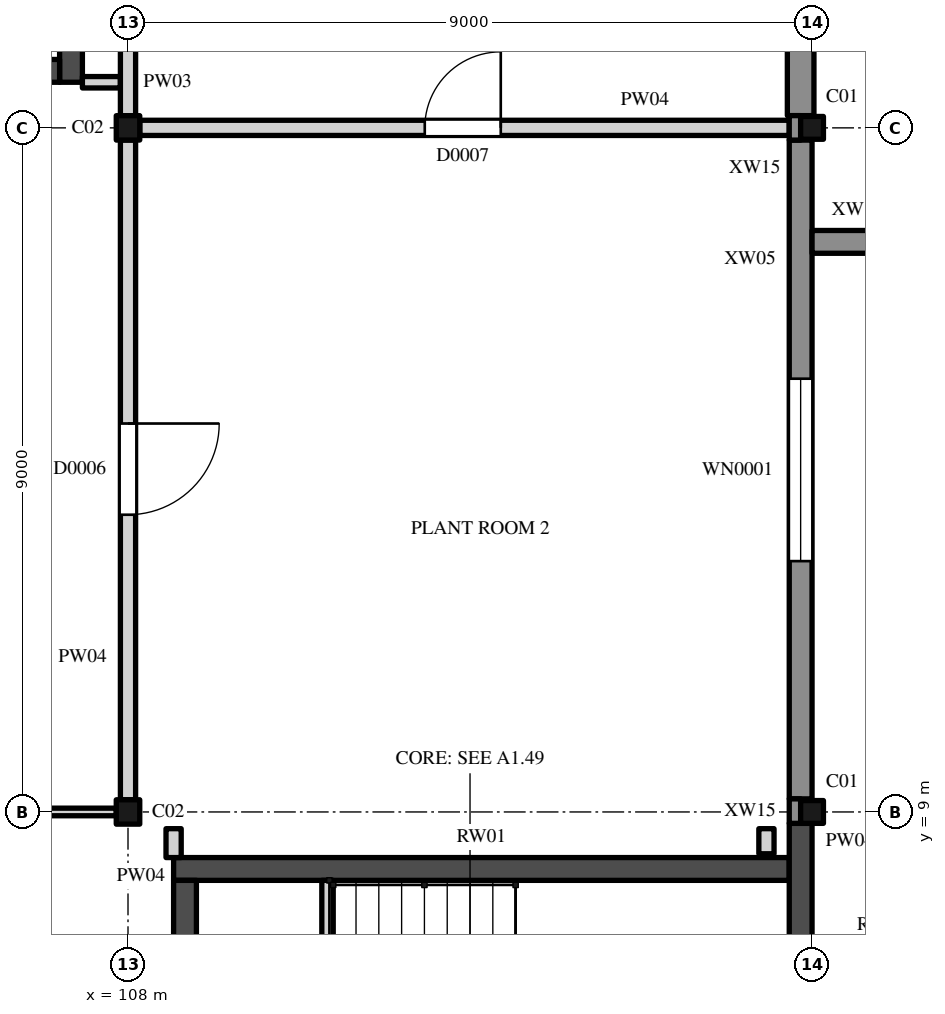
"""IFC4 building model, lengths in metres.
Left out: names, types, materials, properties, quantities, classifications, styles, units other than length and angle.
Written with IfcOpenShell. Run it as: python <this file> out.ifc"""

import sys

from ifc_helpers import new_model, si_unit, direction, frame, frame_2d, origin, origin_2d, place, context, subcontext, project, spatial, polyline, rectangle, hollow_rectangle, i_section, outline, extrude, element, fill, save


model = new_model("IFC4")
c1 = context("Model", 3, precision=1e-05, world=origin(), true_north=direction((0.0, 1.0)))
c2 = subcontext(c1, "Body", "Model", "MODEL_VIEW")
j1 = project(units=[si_unit("LENGTHUNIT", "METRE"), si_unit("PLANEANGLEUNIT", "RADIAN")], contexts=[c1])
p1 = place(None, origin())
s1 = spatial("IfcSite", under=j1, at=p1, CompositionType="ELEMENT")
p2 = place(p1, origin())
s2 = spatial("IfcBuilding", under=s1, at=p2, CompositionType="ELEMENT")
p3 = place(p2, origin())
s3 = spatial("IfcBuildingStorey", under=s2, at=p3, CompositionType="ELEMENT", Elevation=0.0)
p4 = place(p3, frame((108.0, 9.0, 0.0), z_axis=(0.0, 0.0, 1.0), x_axis=(1.0, 0.0, 0.0)))
e1 = element("IfcColumn", 1, at=p4, inside=s3, PredefinedType="COLUMN", context=c2, shape_type="SweptSolid", body=[
    extrude(i_section(OverallWidth=0.309, OverallDepth=0.321, WebThickness=0.014, FlangeThickness=0.022, FilletRadius=0.017, at=origin_2d()), origin(), (0.0, 0.0, 1.0), 6.0),
])
p5 = place(p3, frame((117.0, 9.0, 0.0), z_axis=(0.0, 0.0, 1.0), x_axis=(1.0, 0.0, 0.0)))
e2 = element("IfcColumn", 2, at=p5, inside=s3, PredefinedType="COLUMN", context=c2, shape_type="SweptSolid", body=[
    extrude(hollow_rectangle(XDim=0.3, YDim=0.3, WallThickness=0.012, InnerFilletRadius=0.019, OuterFilletRadius=0.031, at=origin_2d()), origin(), (0.0, 0.0, 1.0), 6.0),
])
p6 = place(p3, frame((108.0, 18.0, 0.0), z_axis=(0.0, 0.0, 1.0), x_axis=(1.0, 0.0, 0.0)))
e3 = element("IfcColumn", 3, at=p6, inside=s3, PredefinedType="COLUMN", context=c2, shape_type="SweptSolid", body=[
    extrude(i_section(OverallWidth=0.309, OverallDepth=0.321, WebThickness=0.014, FlangeThickness=0.022, FilletRadius=0.017, at=origin_2d()), origin(), (0.0, 0.0, 1.0), 6.0),
])
p7 = place(p3, frame((117.0, 18.0, 0.0), z_axis=(0.0, 0.0, 1.0), x_axis=(1.0, 0.0, 0.0)))
e4 = element("IfcColumn", 4, at=p7, inside=s3, PredefinedType="COLUMN", context=c2, shape_type="SweptSolid", body=[
    extrude(hollow_rectangle(XDim=0.3, YDim=0.3, WallThickness=0.012, InnerFilletRadius=0.019, OuterFilletRadius=0.031, at=origin_2d()), origin(), (0.0, 0.0, 1.0), 6.0),
])
p8 = place(p3, frame((108.6, 8.25, 0.0), z_axis=(0.0, 0.0, 1.0), x_axis=(1.0, 0.0, 0.0)))
e5 = element("IfcWall", 5, at=p8, inside=s3, PredefinedType="SHEAR", context=c2, shape_type="SweptSolid", body=[
    extrude(rectangle(XDim=8.1, YDim=0.3, at=frame_2d((4.05, 0.0))), origin(), (0.0, 0.0, 1.0), 6.0),
])
p9 = place(p3, frame((108.75, 0.3, 0.0), z_axis=(0.0, 0.0, 1.0), x_axis=(0.0, 1.0, 0.0)))
e6 = element("IfcWall", 6, at=p9, inside=s3, PredefinedType="SHEAR", context=c2, shape_type="SweptSolid", body=[
    extrude(rectangle(XDim=7.8, YDim=0.3, at=frame_2d((3.9, 0.0))), origin(), (0.0, 0.0, 1.0), 6.0),
])
p10 = place(p9, frame((3.6, 0.0, 0.0)))
e7 = element("IfcOpeningElement", 7, at=p10, cuts=e6, PredefinedType="OPENING", context=c2, shape_type="SweptSolid", body=[
    extrude(rectangle(XDim=1.2, YDim=2.1, at=frame_2d((0.6, 1.05))), frame((0.0, 0.16, 0.0), z_axis=(0.0, -1.0, 0.0), x_axis=(1.0, 0.0, 0.0)), (0.0, 0.0, 1.0), 0.32),
])
p11 = place(p3, frame((116.85, 0.15, 0.0), z_axis=(0.0, 0.0, 1.0), x_axis=(0.0, 1.0, 0.0)))
e8 = element("IfcWall", 8, at=p11, inside=s3, PredefinedType="SHEAR", context=c2, shape_type="SweptSolid", body=[
    extrude(rectangle(XDim=8.7, YDim=0.3, at=frame_2d((4.35, 0.0))), origin(), (0.0, 0.0, 1.0), 6.0),
])
p12 = place(p3, frame((110.625, 2.7, 0.0), z_axis=(0.0, 0.0, 1.0), x_axis=(0.0, 1.0, 0.0)))
e9 = element("IfcWall", 9, at=p12, inside=s3, PredefinedType="STANDARD", context=c2, shape_type="SweptSolid", body=[
    extrude(rectangle(XDim=5.4, YDim=0.15, at=frame_2d((2.7, 0.0))), origin(), (0.0, 0.0, 1.0), 2.8),
])
p13 = place(p3, frame((107.25, 18.6, -1.5), z_axis=(0.0, 0.0, 1.0), x_axis=(0.0, 1.0, 0.0)))
e10 = element("IfcWall", 10, at=p13, inside=s3, PredefinedType="SHEAR", context=c2, shape_type="SweptSolid", body=[
    extrude(rectangle(XDim=4.8, YDim=0.3, at=frame_2d((2.4, 0.0))), origin(), (0.0, 0.0, 1.0), 7.5),
])
p14 = place(p3, frame((103.65, 18.75, -1.5), z_axis=(0.0, 0.0, 1.0), x_axis=(1.0, 0.0, 0.0)))
e11 = element("IfcWall", 11, at=p14, inside=s3, PredefinedType="SHEAR", context=c2, shape_type="SweptSolid", body=[
    extrude(rectangle(XDim=3.45, YDim=0.3, at=frame_2d((1.725, 0.0))), origin(), (0.0, 0.0, 1.0), 7.5),
])
p15 = place(p14, frame((0.75, 0.0, 1.5)))
e12 = element("IfcOpeningElement", 12, at=p15, cuts=e11, PredefinedType="OPENING", context=c2, shape_type="SweptSolid", body=[
    extrude(rectangle(XDim=2.1, YDim=2.4, at=frame_2d((1.05, 1.2))), frame((0.0, 0.16, 0.0), z_axis=(0.0, -1.0, 0.0), x_axis=(1.0, 0.0, 0.0)), (0.0, 0.0, 1.0), 0.32),
])
p16 = place(p3, frame((116.85, 9.172, 0.0), z_axis=(0.0, 0.0, 1.0), x_axis=(0.0, 1.0, 0.0)))
e13 = element("IfcWall", 13, at=p16, inside=s3, PredefinedType="SOLIDWALL", context=c2, shape_type="SweptSolid", body=[
    extrude(rectangle(XDim=8.667, YDim=0.3, at=frame_2d((4.333, 0.0))), origin(), (0.0, 0.0, 1.0), 5.292),
])
p17 = place(p16, frame((3.128, 0.0, 0.9)))
e14 = element("IfcOpeningElement", 14, at=p17, cuts=e13, PredefinedType="OPENING", context=c2, shape_type="SweptSolid", body=[
    extrude(rectangle(XDim=2.4, YDim=1.8, at=frame_2d((1.2, 0.9))), frame((0.0, 0.16, 0.0), z_axis=(0.0, -1.0, 0.0), x_axis=(1.0, 0.0, 0.0)), (0.0, 0.0, 1.0), 0.32),
])
p18 = place(p3, frame((116.85, 18.161, 0.0), z_axis=(0.0, 0.0, 1.0), x_axis=(0.0, 1.0, 0.0)))
e15 = element("IfcWall", 15, at=p18, inside=s3, PredefinedType="SOLIDWALL", context=c2, shape_type="SweptSolid", body=[
    extrude(rectangle(XDim=8.667, YDim=0.35, at=frame_2d((4.333, 0.0))), origin(), (0.0, 0.0, 1.0), 5.292),
])
p19 = place(p18, frame((1.489, 0.0, 1.2)))
e16 = element("IfcOpeningElement", 16, at=p19, cuts=e15, PredefinedType="OPENING", context=c2, shape_type="SweptSolid", body=[
    extrude(rectangle(XDim=1.2, YDim=1.5, at=frame_2d((0.6, 0.75))), frame((0.0, 0.185, 0.0), z_axis=(0.0, -1.0, 0.0), x_axis=(1.0, 0.0, 0.0)), (0.0, 0.0, 1.0), 0.37),
])
p20 = place(p18, frame((5.989, 0.0, 1.2)))
e17 = element("IfcOpeningElement", 17, at=p20, cuts=e15, PredefinedType="OPENING", context=c2, shape_type="SweptSolid", body=[
    extrude(rectangle(XDim=1.2, YDim=1.5, at=frame_2d((0.6, 0.75))), frame((0.0, 0.185, 0.0), z_axis=(0.0, -1.0, 0.0), x_axis=(1.0, 0.0, 0.0)), (0.0, 0.0, 1.0), 0.37),
])
p21 = place(p3, frame((116.775, 8.85, 0.0), z_axis=(0.0, 0.0, 1.0), x_axis=(0.0, 1.0, 0.0)))
e18 = element("IfcWall", 18, at=p21, inside=s3, PredefinedType="SOLIDWALL", context=c2, shape_type="SweptSolid", body=[
    extrude(rectangle(XDim=0.322, YDim=0.15, at=frame_2d((0.161, 0.0))), origin(), (0.0, 0.0, 1.0), 6.0),
])
p22 = place(p3, frame((116.775, 17.839, 0.0), z_axis=(0.0, 0.0, 1.0), x_axis=(0.0, 1.0, 0.0)))
e19 = element("IfcWall", 19, at=p22, inside=s3, PredefinedType="SOLIDWALL", context=c2, shape_type="SweptSolid", body=[
    extrude(rectangle(XDim=0.322, YDim=0.15, at=frame_2d((0.161, 0.0))), origin(), (0.0, 0.0, 1.0), 5.292),
])
p23 = place(p3, frame((117.0, 16.5, 0.0), z_axis=(0.0, 0.0, 1.0), x_axis=(1.0, 0.0, 0.0)))
e20 = element("IfcWall", 20, at=p23, inside=s3, PredefinedType="SOLIDWALL", context=c2, shape_type="SweptSolid", body=[
    extrude(outline(polyline([(0.0, 0.0), (1.2, 0.0), (1.2, 1.2), (0.0, 4.0), (0.0, 0.0)])), frame((0.0, 0.15, 0.0), z_axis=(0.0, -1.0, 0.0), x_axis=(1.0, 0.0, 0.0)), (0.0, 0.0, 1.0), 0.3),
])
p24 = place(p3, frame((99.155, 9.0, 0.0), z_axis=(0.0, 0.0, 1.0), x_axis=(1.0, 0.0, 0.0)))
e21 = element("IfcWall", 21, at=p24, inside=s3, PredefinedType="PARTITIONING", context=c2, shape_type="SweptSolid", body=[
    extrude(rectangle(XDim=8.691, YDim=0.1, at=frame_2d((4.345, 0.0))), origin(), (0.0, 0.0, 1.0), 5.419),
])
p25 = place(p24, frame((3.85, 0.0, 0.0)))
e22 = element("IfcOpeningElement", 22, at=p25, cuts=e21, PredefinedType="OPENING", context=c2, shape_type="SweptSolid", body=[
    extrude(rectangle(XDim=0.9, YDim=2.1, at=frame_2d((0.45, 1.05))), frame((0.0, 0.06, 0.0), z_axis=(0.0, -1.0, 0.0), x_axis=(1.0, 0.0, 0.0)), (0.0, 0.0, 1.0), 0.12),
])
p26 = place(p3, frame((108.155, 18.0, 0.0), z_axis=(0.0, 0.0, 1.0), x_axis=(1.0, 0.0, 0.0)))
e23 = element("IfcWall", 23, at=p26, inside=s3, PredefinedType="PARTITIONING", context=c2, shape_type="SweptSolid", body=[
    extrude(rectangle(XDim=8.545, YDim=0.2, at=frame_2d((4.273, 0.0))), origin(), (0.0, 0.0, 1.0), 5.419),
])
p27 = place(p26, frame((3.75, 0.0, 0.0)))
e24 = element("IfcOpeningElement", 24, at=p27, cuts=e23, PredefinedType="OPENING", context=c2, shape_type="SweptSolid", body=[
    extrude(rectangle(XDim=1.0, YDim=2.1, at=frame_2d((0.5, 1.05))), frame((0.0, 0.11, 0.0), z_axis=(0.0, -1.0, 0.0), x_axis=(1.0, 0.0, 0.0)), (0.0, 0.0, 1.0), 0.22),
])
p28 = place(p3, frame((107.4, 18.6, 0.0), z_axis=(0.0, 0.0, 1.0), x_axis=(1.0, 0.0, 0.0)))
e25 = element("IfcWall", 25, at=p28, inside=s3, PredefinedType="PARTITIONING", context=c2, shape_type="SweptSolid", body=[
    extrude(rectangle(XDim=0.5, YDim=0.15, at=frame_2d((0.25, 0.0))), origin(), (0.0, 0.0, 1.0), 5.825),
])
p29 = place(p3, frame((108.0, 9.16, 0.0), z_axis=(0.0, 0.0, 1.0), x_axis=(0.0, 1.0, 0.0)))
e26 = element("IfcWall", 26, at=p29, inside=s3, PredefinedType="PARTITIONING", context=c2, shape_type="SweptSolid", body=[
    extrude(rectangle(XDim=8.679, YDim=0.2, at=frame_2d((4.34, 0.0))), origin(), (0.0, 0.0, 1.0), 5.292),
])
p30 = place(p29, frame((3.75, 0.0, 0.0)))
e27 = element("IfcOpeningElement", 27, at=p30, cuts=e26, PredefinedType="OPENING", context=c2, shape_type="SweptSolid", body=[
    extrude(rectangle(XDim=1.2, YDim=2.4, at=frame_2d((0.6, 1.2))), frame((0.0, 0.11, 0.0), z_axis=(0.0, -1.0, 0.0), x_axis=(1.0, 0.0, 0.0)), (0.0, 0.0, 1.0), 0.22),
])
p31 = place(p3, frame((108.0, 18.16, 0.0), z_axis=(0.0, 0.0, 1.0), x_axis=(0.0, 1.0, 0.0)))
e28 = element("IfcWall", 28, at=p31, inside=s3, PredefinedType="PARTITIONING", context=c2, shape_type="SweptSolid", body=[
    extrude(rectangle(XDim=8.679, YDim=0.2, at=frame_2d((4.34, 0.0))), origin(), (0.0, 0.0, 1.0), 5.292),
])
p32 = place(p3, frame((108.6, 8.4, 0.0), z_axis=(0.0, 0.0, 1.0), x_axis=(0.0, 1.0, 0.0)))
e29 = element("IfcWall", 29, at=p32, inside=s3, PredefinedType="PARTITIONING", context=c2, shape_type="SweptSolid", body=[
    extrude(rectangle(XDim=0.38, YDim=0.2, at=frame_2d((0.19, 0.0))), origin(), (0.0, 0.0, 1.0), 5.825),
])
p33 = place(p3, frame((116.4, 8.45, 0.0), z_axis=(0.0, 0.0, 1.0), x_axis=(0.0, 1.0, 0.0)))
e30 = element("IfcWall", 30, at=p33, inside=s3, PredefinedType="PARTITIONING", context=c2, shape_type="SweptSolid", body=[
    extrude(rectangle(XDim=0.33, YDim=0.2, at=frame_2d((0.165, 0.0))), origin(), (0.0, 0.0, 1.0), 5.825),
])
p34 = place(p17, origin())
e31 = element("IfcWindow", 31, at=p34, inside=s3, PartitioningType="TRIPLE_PANEL_VERTICAL", PredefinedType="WINDOW", context=c2, shape_type="SweptSolid", body=[
    extrude(rectangle(XDim=2.4, YDim=1.8, at=frame_2d((1.2, 0.9))), frame((0.0, 0.03, 0.0), z_axis=(0.0, -1.0, 0.0), x_axis=(1.0, 0.0, 0.0)), (0.0, 0.0, 1.0), 0.06),
])
fill(e14, e31)
p35 = place(p30, origin())
e32 = element("IfcDoor", 32, at=p35, inside=s3, OperationType="SINGLE_SWING_RIGHT", PredefinedType="DOOR", context=c2, shape_type="SweptSolid", body=[
    extrude(rectangle(XDim=1.2, YDim=2.4, at=frame_2d((0.6, 1.2))), frame((0.0, 0.025, 0.0), z_axis=(0.0, -1.0, 0.0), x_axis=(1.0, 0.0, 0.0)), (0.0, 0.0, 1.0), 0.05),
])
fill(e27, e32)
p36 = place(p27, origin())
e33 = element("IfcDoor", 33, at=p36, inside=s3, OperationType="SINGLE_SWING_LEFT", PredefinedType="DOOR", context=c2, shape_type="SweptSolid", body=[
    extrude(rectangle(XDim=1.0, YDim=2.1, at=frame_2d((0.5, 1.05))), frame((0.0, 0.025, 0.0), z_axis=(0.0, -1.0, 0.0), x_axis=(1.0, 0.0, 0.0)), (0.0, 0.0, 1.0), 0.05),
])
fill(e24, e33)
save(model, sys.argv[1])
